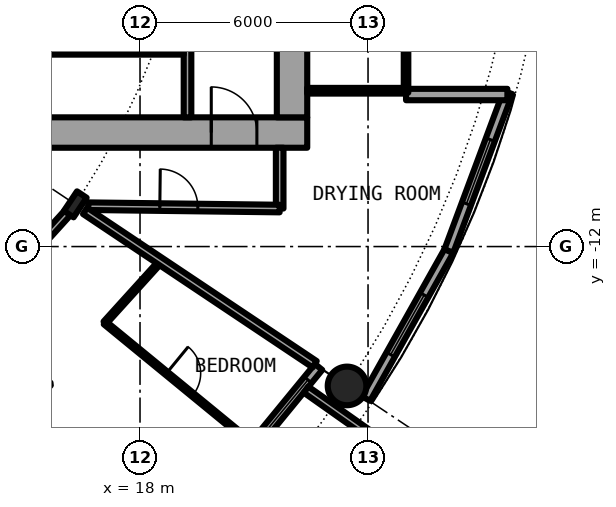
"""IFC4 building model, lengths in metres.
Left out: names, types, materials, properties, quantities, classifications, styles, units other than length and angle.
Written with IfcOpenShell. Run it as: python <this file> out.ifc"""

import sys

from ifc_helpers import new_model, si_unit, direction, frame, frame_2d, origin, origin_2d, place, context, subcontext, project, spatial, rectangle, hollow_circle, i_section, extrude, element, fill, save


model = new_model("IFC4")
c1 = context("Model", 3, precision=1e-05, world=origin(), true_north=direction((0.0, 1.0)))
c2 = subcontext(c1, "Body", "Model", "MODEL_VIEW")
j1 = project(units=[si_unit("LENGTHUNIT", "METRE"), si_unit("PLANEANGLEUNIT", "RADIAN")], contexts=[c1])
p1 = place(None, origin())
s1 = spatial("IfcSite", under=j1, at=p1, CompositionType="ELEMENT")
p2 = place(p1, origin())
s2 = spatial("IfcBuilding", under=s1, at=p2, CompositionType="ELEMENT")
p3 = place(p2, frame((0.0, 0.0, 50.25)))
s3 = spatial("IfcBuildingStorey", under=s2, at=p3, CompositionType="ELEMENT", Elevation=50.25)
p4 = place(p3, frame((23.448, -15.667, 0.0), z_axis=(0.0, 0.0, 1.0), x_axis=(1.0, 0.0, 0.0)))
e1 = element("IfcColumn", 1, at=p4, inside=s3, PredefinedType="COLUMN", context=c2, shape_type="SweptSolid", body=[
    extrude(hollow_circle(Radius=0.508, WallThickness=0.05, at=origin_2d()), origin(), (0.0, 0.0, 1.0), 3.05),
])
p5 = place(p3, frame((16.297, -10.889, 0.0), z_axis=(0.0, 0.0, 1.0), x_axis=(0.831469612303, -0.55557023302, 0.0)))
e2 = element("IfcColumn", 2, at=p5, inside=s3, PredefinedType="COLUMN", context=c2, shape_type="SweptSolid", body=[
    extrude(i_section(OverallWidth=0.305, OverallDepth=0.62, WebThickness=0.021, FlangeThickness=0.04, FilletRadius=0.027, at=origin_2d()), origin(), (0.0, 0.0, 1.0), 3.05),
])
p6 = place(p3, frame((19.304, -19.304, 0.0), z_axis=(0.0, 0.0, 1.0), x_axis=(0.634382322723, 0.773019449054, 0.0)))
e3 = element("IfcWall", 3, at=p6, inside=s3, PredefinedType="SOLIDWALL", context=c2, shape_type="SweptSolid", body=[
    extrude(rectangle(XDim=5.352, YDim=0.25, at=frame_2d((2.676, 0.0))), origin(), (0.0, 0.0, 1.0), 2.7),
])
p7 = place(p6, frame((0.841, 0.0, 0.0)))
e4 = element("IfcOpeningElement", 4, at=p7, cuts=e3, PredefinedType="OPENING", context=c2, shape_type="SweptSolid", body=[
    extrude(rectangle(XDim=1.0, YDim=2.2, at=frame_2d((0.5, 1.1))), frame((0.0, 0.135, 0.0), z_axis=(0.0, -1.0, 0.0), x_axis=(1.0, 0.0, 0.0)), (0.0, 0.0, 1.0), 0.27),
])
p8 = place(p6, frame((3.111, 0.0, 0.3)))
e5 = element("IfcOpeningElement", 5, at=p8, cuts=e3, PredefinedType="OPENING", context=c2, shape_type="SweptSolid", body=[
    extrude(rectangle(XDim=1.8, YDim=2.1, at=frame_2d((0.9, 1.05))), frame((0.0, 0.135, 0.0), z_axis=(0.0, -1.0, 0.0), x_axis=(1.0, 0.0, 0.0)), (0.0, 0.0, 1.0), 0.27),
])
p9 = place(p3, frame((22.37, -15.765, -0.03), z_axis=(0.0, 0.0, 1.0), x_axis=(0.817256123454, -0.576274612209, 0.0)))
e6 = element("IfcWall", 6, at=p9, inside=s3, PredefinedType="SOLIDWALL", context=c2, shape_type="SweptSolid", body=[
    extrude(rectangle(XDim=2.933, YDim=0.2, at=frame_2d((1.466, 0.0))), origin(), (0.0, 0.0, 1.0), 2.73),
])
p10 = place(p3, frame((23.946, -16.0, 0.0), z_axis=(0.0, 0.0, 1.0), x_axis=(0.489696356642, 0.871893042919, 0.0)))
e7 = element("IfcWall", 7, at=p10, inside=s3, PredefinedType="SOLIDWALL", context=c2, shape_type="SweptSolid", body=[
    extrude(rectangle(XDim=4.454, YDim=0.25, at=frame_2d((2.227, 0.0))), origin(), (0.0, 0.0, 1.0), 2.7),
])
p11 = place(p10, frame((1.327, 0.0, 0.3)))
e8 = element("IfcOpeningElement", 8, at=p11, cuts=e7, PredefinedType="OPENING", context=c2, shape_type="SweptSolid", body=[
    extrude(rectangle(XDim=1.8, YDim=2.1, at=frame_2d((0.9, 1.05))), frame((0.0, 0.135, 0.0), z_axis=(0.0, -1.0, 0.0), x_axis=(1.0, 0.0, 0.0)), (0.0, 0.0, 1.0), 0.27),
])
p12 = place(p3, frame((26.127, -12.117, 0.0), z_axis=(0.0, 0.0, 1.0), x_axis=(0.349247811493, 0.937030397675, 0.0)))
e9 = element("IfcWall", 9, at=p12, inside=s3, PredefinedType="SOLIDWALL", context=c2, shape_type="SweptSolid", body=[
    extrude(rectangle(XDim=4.452, YDim=0.25, at=frame_2d((2.226, 0.0))), origin(), (0.0, 0.0, 1.0), 2.7),
])
p13 = place(p12, frame((1.327, 0.0, 0.3)))
e10 = element("IfcOpeningElement", 10, at=p13, cuts=e9, PredefinedType="OPENING", context=c2, shape_type="SweptSolid", body=[
    extrude(rectangle(XDim=1.8, YDim=2.1, at=frame_2d((0.9, 1.05))), frame((0.0, 0.135, 0.0), z_axis=(0.0, -1.0, 0.0), x_axis=(1.0, 0.0, 0.0)), (0.0, 0.0, 1.0), 0.27),
])
p14 = place(p3, frame((25.0, -8.0, 0.0), z_axis=(0.0, 0.0, 1.0), x_axis=(1.0, 0.0, 0.0)))
e11 = element("IfcWall", 11, at=p14, inside=s3, PredefinedType="SOLIDWALL", context=c2, shape_type="SweptSolid", body=[
    extrude(rectangle(XDim=2.667, YDim=0.3, at=frame_2d((1.333, 0.0))), origin(), (0.0, 0.0, 1.0), 2.7),
])
p15 = place(p3, frame((8.2, -9.0, 0.0), z_axis=(0.0, 0.0, 1.0), x_axis=(1.0, 0.0, 0.0)))
e12 = element("IfcWall", 12, at=p15, inside=s3, PredefinedType="SHEAR", context=c2, shape_type="SweptSolid", body=[
    extrude(rectangle(XDim=14.2, YDim=0.8, at=frame_2d((7.1, 0.0))), origin(), (0.0, 0.0, 1.0), 3.05),
])
p16 = place(p15, frame((11.675, 0.0, 0.0)))
e13 = element("IfcOpeningElement", 13, at=p16, cuts=e12, PredefinedType="OPENING", context=c2, shape_type="SweptSolid", body=[
    extrude(rectangle(XDim=1.2, YDim=2.3, at=frame_2d((0.6, 1.15))), frame((0.0, 0.41, 0.0), z_axis=(0.0, -1.0, 0.0), x_axis=(1.0, 0.0, 0.0)), (0.0, 0.0, 1.0), 0.82),
])
p17 = place(p3, frame((22.0, 8.6, 0.0), z_axis=(0.0, 0.0, 1.0), x_axis=(0.0, -1.0, 0.0)))
e14 = element("IfcWall", 14, at=p17, inside=s3, PredefinedType="SHEAR", context=c2, shape_type="SweptSolid", body=[
    extrude(rectangle(XDim=17.2, YDim=0.8, at=frame_2d((8.6, 0.0))), origin(), (0.0, 0.0, 1.0), 3.05),
])
p18 = place(p17, frame((7.7, 0.0, 0.0)))
e15 = element("IfcOpeningElement", 15, at=p18, cuts=e14, PredefinedType="OPENING", context=c2, shape_type="SweptSolid", body=[
    extrude(rectangle(XDim=1.8, YDim=2.3, at=frame_2d((0.9, 1.15))), frame((0.0, 0.41, 0.0), z_axis=(0.0, -1.0, 0.0), x_axis=(1.0, 0.0, 0.0)), (0.0, 0.0, 1.0), 0.82),
])
p19 = place(p3, frame((19.25, -8.6, 0.0), z_axis=(0.0, 0.0, 1.0), x_axis=(0.0, 1.0, 0.0)))
e16 = element("IfcWall", 16, at=p19, inside=s3, PredefinedType="SOLIDWALL", context=c2, shape_type="SweptSolid", body=[
    extrude(rectangle(XDim=7.025, YDim=0.2, at=frame_2d((3.513, 0.0))), origin(), (0.0, 0.0, 1.0), 2.7),
])
p20 = place(p19, frame((2.35, 0.0, 0.0)))
e17 = element("IfcOpeningElement", 17, at=p20, cuts=e16, PredefinedType="OPENING", context=c2, shape_type="SweptSolid", body=[
    extrude(rectangle(XDim=1.1, YDim=2.3, at=frame_2d((0.55, 1.15))), frame((0.0, 0.11, 0.0), z_axis=(0.0, -1.0, 0.0), x_axis=(1.0, 0.0, 0.0)), (0.0, 0.0, 1.0), 0.22),
])
p21 = place(p3, frame((15.45, -6.875, 0.0), z_axis=(0.0, 0.0, 1.0), x_axis=(1.0, 0.0, 0.0)))
e18 = element("IfcWall", 18, at=p21, inside=s3, PredefinedType="PARTITIONING", context=c2, shape_type="SweptSolid", body=[
    extrude(rectangle(XDim=3.7, YDim=0.15, at=frame_2d((1.85, 0.0))), origin(), (0.0, 0.0, 1.0), 2.7),
])
p22 = place(p21, frame((1.4, 0.0, 0.0)))
e19 = element("IfcOpeningElement", 19, at=p22, cuts=e18, PredefinedType="OPENING", context=c2, shape_type="SweptSolid", body=[
    extrude(rectangle(XDim=0.9, YDim=2.3, at=frame_2d((0.45, 1.15))), frame((0.0, 0.085, 0.0), z_axis=(0.0, -1.0, 0.0), x_axis=(1.0, 0.0, 0.0)), (0.0, 0.0, 1.0), 0.17),
])
p23 = place(p3, frame((22.4, -7.9, 0.0), z_axis=(0.0, 0.0, 1.0), x_axis=(1.0, 0.0, 0.0)))
e20 = element("IfcWall", 20, at=p23, inside=s3, PredefinedType="PARTITIONING", context=c2, shape_type="SweptSolid", body=[
    extrude(rectangle(XDim=2.54, YDim=0.15, at=frame_2d((1.27, 0.0))), origin(), (0.0, 0.0, 1.0), 2.7),
])
p24 = place(p3, frame((25.0, -7.95, 0.0), z_axis=(0.0, 0.0, 1.0), x_axis=(0.0, 1.0, 0.0)))
e21 = element("IfcWall", 21, at=p24, inside=s3, PredefinedType="PARTITIONING", context=c2, shape_type="SweptSolid", body=[
    extrude(rectangle(XDim=15.9, YDim=0.12, at=frame_2d((7.95, 0.0))), origin(), (0.0, 0.0, 1.0), 2.7),
])
p25 = place(p24, frame((0.95, 0.0, 0.1)))
e22 = element("IfcOpeningElement", 22, at=p25, cuts=e21, PredefinedType="OPENING", context=c2, shape_type="SweptSolid", body=[
    extrude(rectangle(XDim=14.0, YDim=2.35, at=frame_2d((7.0, 1.175))), frame((0.0, 0.07, 0.0), z_axis=(0.0, -1.0, 0.0), x_axis=(1.0, 0.0, 0.0)), (0.0, 0.0, 1.0), 0.14),
])
p26 = place(p3, frame((17.077, -14.006, 0.0), z_axis=(0.0, 0.0, 1.0), x_axis=(0.671396556615, 0.741098282123, 0.0)))
e23 = element("IfcWall", 23, at=p26, inside=s3, PredefinedType="PARTITIONING", context=c2, shape_type="SweptSolid", body=[
    extrude(rectangle(XDim=2.182, YDim=0.1, at=frame_2d((1.091, 0.0))), origin(), (0.0, 0.0, 1.0), 2.7),
])
p27 = place(p3, frame((21.675, -11.0, 0.0), z_axis=(0.0, 0.0, 1.0), x_axis=(0.0, 1.0, 0.0)))
e24 = element("IfcWall", 24, at=p27, inside=s3, PredefinedType="PARTITIONING", context=c2, shape_type="SweptSolid", body=[
    extrude(rectangle(XDim=1.6, YDim=0.2, at=frame_2d((0.8, 0.0))), origin(), (0.0, 0.0, 1.0), 2.7),
])
p28 = place(p3, frame((12.434, -15.151, 0.0), z_axis=(0.0, 0.0, 1.0), x_axis=(0.671514934772, 0.740991020444, 0.0)))
e25 = element("IfcWall", 25, at=p28, inside=s3, PredefinedType="PARTITIONING", context=c2, shape_type="SweptSolid", body=[
    extrude(rectangle(XDim=5.598, YDim=0.2, at=frame_2d((2.799, 0.0))), origin(), (0.0, 0.0, 1.0), 2.38),
])
p29 = place(p28, frame((3.305, 0.0, 0.0)))
e26 = element("IfcOpeningElement", 26, at=p29, cuts=e25, PredefinedType="OPENING", context=c2, shape_type="SweptSolid", body=[
    extrude(rectangle(XDim=1.0, YDim=2.3, at=frame_2d((0.5, 1.15))), frame((0.0, 0.11, 0.0), z_axis=(0.0, -1.0, 0.0), x_axis=(1.0, 0.0, 0.0)), (0.0, 0.0, 1.0), 0.22),
])
p30 = place(p3, frame((16.637, -10.938, 0.0), z_axis=(0.0, 0.0, 1.0), x_axis=(0.99992425795, -0.012307654658, 0.0)))
e27 = element("IfcWall", 27, at=p30, inside=s3, PredefinedType="PARTITIONING", context=c2, shape_type="SweptSolid", body=[
    extrude(rectangle(XDim=5.039, YDim=0.2, at=frame_2d((2.519, 0.0))), origin(), (0.0, 0.0, 1.0), 2.7),
])
p31 = place(p30, frame((1.884, 0.0, 0.0)))
e28 = element("IfcOpeningElement", 28, at=p31, cuts=e27, PredefinedType="OPENING", context=c2, shape_type="SweptSolid", body=[
    extrude(rectangle(XDim=1.0, YDim=2.3, at=frame_2d((0.5, 1.15))), frame((0.0, 0.11, 0.0), z_axis=(0.0, -1.0, 0.0), x_axis=(1.0, 0.0, 0.0)), (0.0, 0.0, 1.0), 0.22),
])
p32 = place(p3, frame((12.434, -15.151, 0.0), z_axis=(0.0, 0.0, 1.0), x_axis=(0.634381303318, -0.773020285633, 0.0)))
e29 = element("IfcWall", 29, at=p32, inside=s3, PredefinedType="PARTITIONING", context=c2, shape_type="SweptSolid", body=[
    extrude(rectangle(XDim=7.576, YDim=0.2, at=frame_2d((3.788, 0.0))), origin(), (0.0, 0.0, 1.0), 2.7),
])
p33 = place(p3, frame((16.555, -11.061, 0.0), z_axis=(0.0, 0.0, 1.0), x_axis=(0.831465568067, -0.555576285599, 0.0)))
e30 = element("IfcWall", 30, at=p33, inside=s3, PredefinedType="PARTITIONING", context=c2, shape_type="SweptSolid", body=[
    extrude(rectangle(XDim=7.264, YDim=0.2, at=frame_2d((3.632, 0.0))), origin(), (0.0, 0.0, 1.0), 2.7),
])
p34 = place(p3, frame((17.077, -14.006, 0.0), z_axis=(0.0, 0.0, 1.0), x_axis=(0.77326214499, -0.634086472908, 0.0)))
e31 = element("IfcWall", 31, at=p34, inside=s3, PredefinedType="PARTITIONING", context=c2, shape_type="SweptSolid", body=[
    extrude(rectangle(XDim=5.089, YDim=0.1, at=frame_2d((2.544, 0.0))), origin(), (0.0, 0.0, 1.0), 2.7),
])
p35 = place(p34, frame((2.094, 0.0, 0.0)))
e32 = element("IfcOpeningElement", 32, at=p35, cuts=e31, PredefinedType="OPENING", context=c2, shape_type="SweptSolid", body=[
    extrude(rectangle(XDim=0.9, YDim=2.3, at=frame_2d((0.45, 1.15))), frame((0.0, 0.06, 0.0), z_axis=(0.0, -1.0, 0.0), x_axis=(1.0, 0.0, 0.0)), (0.0, 0.0, 1.0), 0.12),
])
p36 = place(p8, origin())
e33 = element("IfcWindow", 33, at=p36, inside=s3, PartitioningType="SINGLE_PANEL", PredefinedType="WINDOW", context=c2, shape_type="SweptSolid", body=[
    extrude(rectangle(XDim=1.8, YDim=2.1, at=frame_2d((0.9, 1.05))), frame((0.0, 0.03, 0.0), z_axis=(0.0, -1.0, 0.0), x_axis=(1.0, 0.0, 0.0)), (0.0, 0.0, 1.0), 0.06),
])
fill(e5, e33)
p37 = place(p11, origin())
e34 = element("IfcWindow", 34, at=p37, inside=s3, PartitioningType="SINGLE_PANEL", PredefinedType="WINDOW", context=c2, shape_type="SweptSolid", body=[
    extrude(rectangle(XDim=1.8, YDim=2.1, at=frame_2d((0.9, 1.05))), frame((0.0, 0.03, 0.0), z_axis=(0.0, -1.0, 0.0), x_axis=(1.0, 0.0, 0.0)), (0.0, 0.0, 1.0), 0.06),
])
fill(e8, e34)
p38 = place(p13, origin())
e35 = element("IfcWindow", 35, at=p38, inside=s3, PartitioningType="SINGLE_PANEL", PredefinedType="WINDOW", context=c2, shape_type="SweptSolid", body=[
    extrude(rectangle(XDim=1.8, YDim=2.1, at=frame_2d((0.9, 1.05))), frame((0.0, 0.03, 0.0), z_axis=(0.0, -1.0, 0.0), x_axis=(1.0, 0.0, 0.0)), (0.0, 0.0, 1.0), 0.06),
])
fill(e10, e35)
p39 = place(p22, origin())
e36 = element("IfcDoor", 36, at=p39, inside=s3, OperationType="SINGLE_SWING_LEFT", PredefinedType="DOOR", context=c2, shape_type="SweptSolid", body=[
    extrude(rectangle(XDim=0.9, YDim=2.3, at=frame_2d((0.45, 1.15))), frame((0.0, 0.025, 0.0), z_axis=(0.0, -1.0, 0.0), x_axis=(1.0, 0.0, 0.0)), (0.0, 0.0, 1.0), 0.05),
])
fill(e19, e36)
p40 = place(p16, origin())
e37 = element("IfcDoor", 37, at=p40, inside=s3, OperationType="SINGLE_SWING_LEFT", PredefinedType="DOOR", context=c2, shape_type="SweptSolid", body=[
    extrude(rectangle(XDim=1.2, YDim=2.3, at=frame_2d((0.6, 1.15))), frame((0.0, 0.025, 0.0), z_axis=(0.0, -1.0, 0.0), x_axis=(1.0, 0.0, 0.0)), (0.0, 0.0, 1.0), 0.05),
])
fill(e13, e37)
p41 = place(p25, origin())
e38 = element("IfcWindow", 38, at=p41, inside=s3, PartitioningType="SINGLE_PANEL", PredefinedType="WINDOW", context=c2, shape_type="SweptSolid", body=[
    extrude(rectangle(XDim=14.0, YDim=2.35, at=frame_2d((7.0, 1.175))), frame((0.0, 0.03, 0.0), z_axis=(0.0, -1.0, 0.0), x_axis=(1.0, 0.0, 0.0)), (0.0, 0.0, 1.0), 0.06),
])
fill(e22, e38)
p42 = place(p35, origin())
e39 = element("IfcDoor", 39, at=p42, inside=s3, OperationType="SINGLE_SWING_LEFT", PredefinedType="DOOR", context=c2, shape_type="SweptSolid", body=[
    extrude(rectangle(XDim=0.9, YDim=2.3, at=frame_2d((0.45, 1.15))), frame((0.0, 0.025, 0.0), z_axis=(0.0, -1.0, 0.0), x_axis=(1.0, 0.0, 0.0)), (0.0, 0.0, 1.0), 0.05),
])
fill(e32, e39)
p43 = place(p31, origin())
e40 = element("IfcDoor", 40, at=p43, inside=s3, OperationType="SINGLE_SWING_LEFT", PredefinedType="DOOR", context=c2, shape_type="SweptSolid", body=[
    extrude(rectangle(XDim=1.0, YDim=2.3, at=frame_2d((0.5, 1.15))), frame((0.0, 0.025, 0.0), z_axis=(0.0, -1.0, 0.0), x_axis=(1.0, 0.0, 0.0)), (0.0, 0.0, 1.0), 0.05),
])
fill(e28, e40)
save(model, sys.argv[1])
